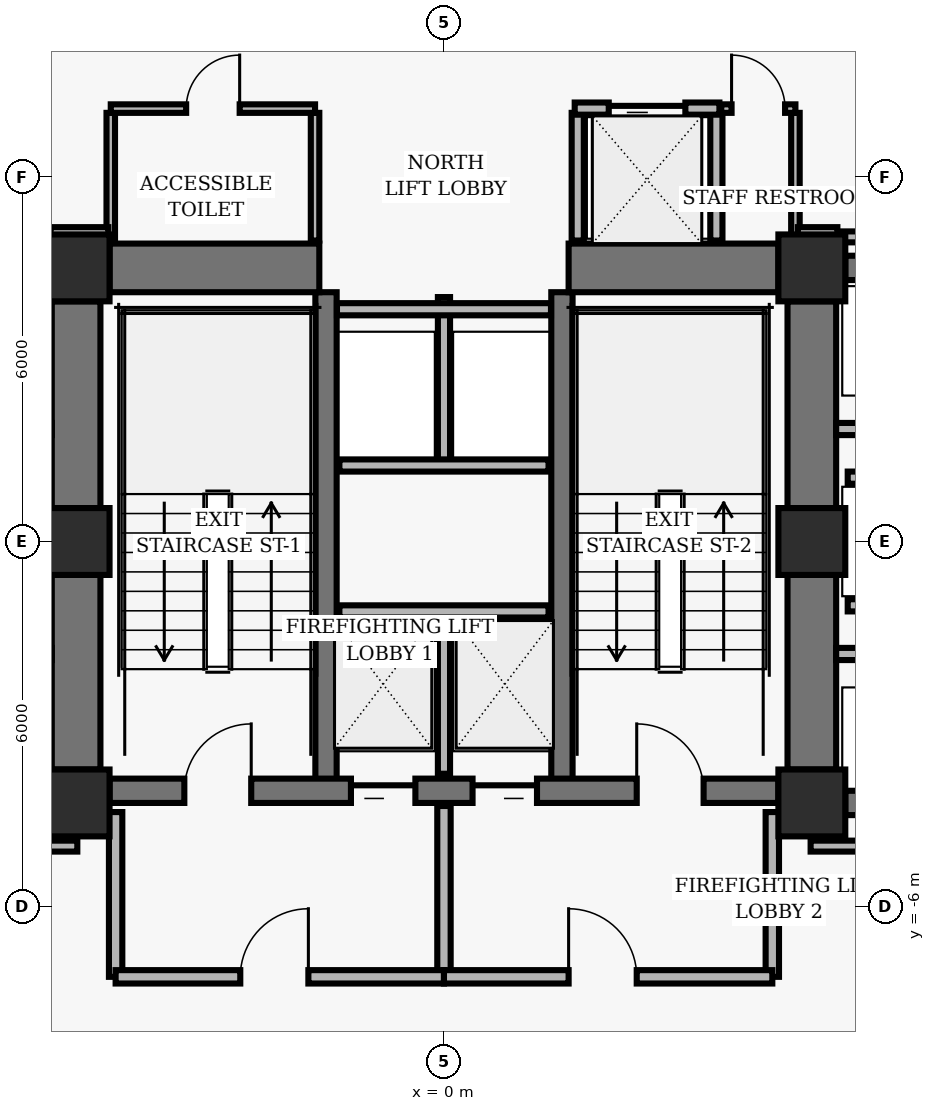
"""IFC4 building model, lengths in metres.
Left out: names, types, materials, properties, quantities, classifications, styles, units other than length and angle.
Written with IfcOpenShell. Run it as: python <this file> out.ifc"""

import sys

from ifc_helpers import new_model, si_unit, direction, frame, frame_2d, origin, origin_2d, place, context, subcontext, project, spatial, rectangle, hollow_rectangle, extrude, element, fill, save


model = new_model("IFC4")
c1 = context("Model", 3, precision=1e-05, world=origin(), true_north=direction((0.0, 1.0)))
c2 = subcontext(c1, "Body", "Model", "MODEL_VIEW")
j1 = project(units=[si_unit("LENGTHUNIT", "METRE"), si_unit("PLANEANGLEUNIT", "RADIAN")], contexts=[c1])
p1 = place(None, origin())
s1 = spatial("IfcSite", under=j1, at=p1, CompositionType="ELEMENT")
p2 = place(p1, origin())
s2 = spatial("IfcBuilding", under=s1, at=p2, CompositionType="ELEMENT")
p3 = place(p2, frame((0.0, 0.0, 4.8)))
s3 = spatial("IfcBuildingStorey", under=s2, at=p3, CompositionType="ELEMENT", Elevation=4.8)
for number, where, z_axis, x_axis in (
    (1, (-6.05, 4.5, 0.0), (0.0, 0.0, 1.0), (1.0, 0.0, 0.0)),
    (2, (6.05, 4.5, 0.0), (0.0, 0.0, 1.0), (1.0, 0.0, 0.0)),
    (3, (-6.05, 0.0, 0.0), (0.0, 0.0, 1.0), (1.0, 0.0, 0.0)),
    (4, (6.05, 0.0, 0.0), (0.0, 0.0, 1.0), (1.0, 0.0, 0.0)),
    (5, (-6.05, -4.3, 0.0), (0.0, 0.0, 1.0), (1.0, 0.0, 0.0)),
    (6, (6.05, -4.3, 0.0), (0.0, 0.0, 1.0), (1.0, 0.0, 0.0)),
):
    element("IfcColumn", number, at=place(p3, frame(where, z_axis=z_axis, x_axis=x_axis)), inside=s3, PredefinedType="COLUMN", context=c2, shape_type="SweptSolid", body=[
        extrude(hollow_rectangle(XDim=1.1, YDim=1.1, WallThickness=0.07, InnerFilletRadius=0.02, OuterFilletRadius=0.04, at=origin_2d()), origin(), (0.0, 0.0, 1.0), 3.52),
    ])
p4 = place(p3, frame((-6.05, 0.55, 0.0), z_axis=(0.0, 0.0, 1.0), x_axis=(0.0, 1.0, 0.0)))
e7 = element("IfcWall", 7, at=p4, inside=s3, PredefinedType="SHEAR", context=c2, shape_type="SweptSolid", body=[
    extrude(rectangle(XDim=3.4, YDim=0.8, at=frame_2d((1.7, 0.0))), origin(), (0.0, 0.0, 1.0), 3.218),
])
p5 = place(p3, frame((-6.05, -3.75, 0.0), z_axis=(0.0, 0.0, 1.0), x_axis=(0.0, 1.0, 0.0)))
e8 = element("IfcWall", 8, at=p5, inside=s3, PredefinedType="SHEAR", context=c2, shape_type="SweptSolid", body=[
    extrude(rectangle(XDim=3.2, YDim=0.8, at=frame_2d((1.6, 0.0))), origin(), (0.0, 0.0, 1.0), 3.218),
])
p6 = place(p3, frame((6.05, 0.55, 0.0), z_axis=(0.0, 0.0, 1.0), x_axis=(0.0, 1.0, 0.0)))
e9 = element("IfcWall", 9, at=p6, inside=s3, PredefinedType="SHEAR", context=c2, shape_type="SweptSolid", body=[
    extrude(rectangle(XDim=3.4, YDim=0.8, at=frame_2d((1.7, 0.0))), origin(), (0.0, 0.0, 1.0), 3.218),
])
p7 = place(p3, frame((6.05, -3.75, 0.0), z_axis=(0.0, 0.0, 1.0), x_axis=(0.0, 1.0, 0.0)))
e10 = element("IfcWall", 10, at=p7, inside=s3, PredefinedType="SHEAR", context=c2, shape_type="SweptSolid", body=[
    extrude(rectangle(XDim=3.2, YDim=0.8, at=frame_2d((1.6, 0.0))), origin(), (0.0, 0.0, 1.0), 3.218),
])
for number, where, z_axis, x_axis in (
    (11, (-1.94, -4.1, 0.0), (0.0, 0.0, 1.0), (0.0, 1.0, 0.0)),
    (12, (1.94, -4.1, 0.0), (0.0, 0.0, 1.0), (0.0, 1.0, 0.0)),
):
    element("IfcWall", number, at=place(p3, frame(where, z_axis=z_axis, x_axis=x_axis)), inside=s3, PredefinedType="SHEAR", context=c2, shape_type="SweptSolid", body=[
        extrude(rectangle(XDim=8.2, YDim=0.35, at=frame_2d((4.1, 0.0))), origin(), (0.0, 0.0, 1.0), 3.218),
    ])
p8 = place(p3, frame((-5.5, -4.1, 0.0), z_axis=(0.0, 0.0, 1.0), x_axis=(1.0, 0.0, 0.0)))
e13 = element("IfcWall", 13, at=p8, inside=s3, PredefinedType="SHEAR", context=c2, shape_type="SweptSolid", body=[
    extrude(rectangle(XDim=11.0, YDim=0.4, at=frame_2d((5.5, 0.0))), origin(), (0.0, 0.0, 1.0), 3.218),
])
p9 = place(p8, frame((1.23, 0.0, 0.0)))
e14 = element("IfcOpeningElement", 14, at=p9, cuts=e13, PredefinedType="OPENING", context=c2, shape_type="SweptSolid", body=[
    extrude(rectangle(XDim=1.1, YDim=2.04, at=frame_2d((0.55, 1.02))), frame((0.0, 0.21, 0.0), z_axis=(0.0, -1.0, 0.0), x_axis=(1.0, 0.0, 0.0)), (0.0, 0.0, 1.0), 0.42),
])
p10 = place(p8, frame((8.67, 0.0, 0.0)))
e15 = element("IfcOpeningElement", 15, at=p10, cuts=e13, PredefinedType="OPENING", context=c2, shape_type="SweptSolid", body=[
    extrude(rectangle(XDim=1.1, YDim=2.04, at=frame_2d((0.55, 1.02))), frame((0.0, 0.21, 0.0), z_axis=(0.0, -1.0, 0.0), x_axis=(1.0, 0.0, 0.0)), (0.0, 0.0, 1.0), 0.42),
])
p11 = place(p8, frame((3.97, 0.0, 0.0)))
e16 = element("IfcOpeningElement", 16, at=p11, cuts=e13, PredefinedType="OPENING", context=c2, shape_type="SweptSolid", body=[
    extrude(rectangle(XDim=1.06, YDim=2.04, at=frame_2d((0.53, 1.02))), frame((0.0, 0.21, 0.0), z_axis=(0.0, -1.0, 0.0), x_axis=(1.0, 0.0, 0.0)), (0.0, 0.0, 1.0), 0.42),
])
p12 = place(p8, frame((5.97, 0.0, 0.0)))
e17 = element("IfcOpeningElement", 17, at=p12, cuts=e13, PredefinedType="OPENING", context=c2, shape_type="SweptSolid", body=[
    extrude(rectangle(XDim=1.06, YDim=2.04, at=frame_2d((0.53, 1.02))), frame((0.0, 0.21, 0.0), z_axis=(0.0, -1.0, 0.0), x_axis=(1.0, 0.0, 0.0)), (0.0, 0.0, 1.0), 0.42),
])
for number, where, z_axis, x_axis in (
    (18, (-5.5, 4.5, 0.0), (0.0, 0.0, 1.0), (1.0, 0.0, 0.0)),
    (19, (2.05, 4.5, 0.0), (0.0, 0.0, 1.0), (1.0, 0.0, 0.0)),
):
    element("IfcWall", number, at=place(p3, frame(where, z_axis=z_axis, x_axis=x_axis)), inside=s3, PredefinedType="SHEAR", context=c2, shape_type="SweptSolid", body=[
        extrude(rectangle(XDim=3.45, YDim=0.8, at=frame_2d((1.725, 0.0))), origin(), (0.0, 0.0, 1.0), 3.218),
    ])
for number, where, z_axis, x_axis in (
    (20, (6.6, 4.5, 0.0), (0.0, 0.0, 1.0), (1.0, 0.0, 0.0)),
    (21, (6.6, -4.3, 0.0), (0.0, 0.0, 1.0), (1.0, 0.0, 0.0)),
):
    element("IfcWall", number, at=place(p3, frame(where, z_axis=z_axis, x_axis=x_axis)), inside=s3, PredefinedType="SHEAR", context=c2, shape_type="SweptSolid", body=[
        extrude(rectangle(XDim=1.8, YDim=0.4, at=frame_2d((0.9, 0.0))), origin(), (0.0, 0.0, 1.0), 3.218),
    ])
p13 = place(p3, frame((0.0, -3.82, 0.0), z_axis=(0.0, 0.0, 1.0), x_axis=(0.0, 1.0, 0.0)))
e22 = element("IfcWall", 22, at=p13, inside=s3, PredefinedType="PARTITIONING", context=c2, shape_type="SweptSolid", body=[
    extrude(rectangle(XDim=2.67, YDim=0.2, at=frame_2d((1.335, 0.0))), origin(), (0.0, 0.0, 1.0), 3.193),
])
p14 = place(p3, frame((-1.72, -1.15, 0.0), z_axis=(0.0, 0.0, 1.0), x_axis=(1.0, 0.0, 0.0)))
e23 = element("IfcWall", 23, at=p14, inside=s3, PredefinedType="PARTITIONING", context=c2, shape_type="SweptSolid", body=[
    extrude(rectangle(XDim=3.44, YDim=0.2, at=frame_2d((1.72, 0.0))), origin(), (0.0, 0.0, 1.0), 3.193),
])
for number, where, z_axis, x_axis in (
    (24, (-5.4, -7.16, 0.0), (0.0, 0.0, 1.0), (0.0, 1.0, 0.0)),
    (25, (5.4, -7.16, 0.0), (0.0, 0.0, 1.0), (0.0, 1.0, 0.0)),
):
    element("IfcWall", number, at=place(p3, frame(where, z_axis=z_axis, x_axis=x_axis)), inside=s3, PredefinedType="PARTITIONING", context=c2, shape_type="SweptSolid", body=[
        extrude(rectangle(XDim=2.71, YDim=0.22, at=frame_2d((1.355, 0.0))), origin(), (0.0, 0.0, 1.0), 3.193),
    ])
p15 = place(p3, frame((0.0, -7.16, 0.0), z_axis=(0.0, 0.0, 1.0), x_axis=(0.0, 1.0, 0.0)))
e26 = element("IfcWall", 26, at=p15, inside=s3, PredefinedType="PARTITIONING", context=c2, shape_type="SweptSolid", body=[
    extrude(rectangle(XDim=2.81, YDim=0.22, at=frame_2d((1.405, 0.0))), origin(), (0.0, 0.0, 1.0), 3.193),
])
p16 = place(p3, frame((-5.4, -7.16, 0.0), z_axis=(0.0, 0.0, 1.0), x_axis=(1.0, 0.0, 0.0)))
e27 = element("IfcWall", 27, at=p16, inside=s3, PredefinedType="PARTITIONING", context=c2, shape_type="SweptSolid", body=[
    extrude(rectangle(XDim=5.4, YDim=0.22, at=frame_2d((2.7, 0.0))), origin(), (0.0, 0.0, 1.0), 3.193),
])
p17 = place(p16, frame((2.05, 0.0, 0.0)))
e28 = element("IfcOpeningElement", 28, at=p17, cuts=e27, PredefinedType="OPENING", context=c2, shape_type="SweptSolid", body=[
    extrude(rectangle(XDim=1.12, YDim=2.02, at=frame_2d((0.56, 1.01))), frame((0.0, 0.12, 0.0), z_axis=(0.0, -1.0, 0.0), x_axis=(1.0, 0.0, 0.0)), (0.0, 0.0, 1.0), 0.24),
])
p18 = place(p3, frame((0.0, -7.16, 0.0), z_axis=(0.0, 0.0, 1.0), x_axis=(1.0, 0.0, 0.0)))
e29 = element("IfcWall", 29, at=p18, inside=s3, PredefinedType="PARTITIONING", context=c2, shape_type="SweptSolid", body=[
    extrude(rectangle(XDim=5.4, YDim=0.22, at=frame_2d((2.7, 0.0))), origin(), (0.0, 0.0, 1.0), 3.193),
])
p19 = place(p18, frame((2.05, 0.0, 0.0)))
e30 = element("IfcOpeningElement", 30, at=p19, cuts=e29, PredefinedType="OPENING", context=c2, shape_type="SweptSolid", body=[
    extrude(rectangle(XDim=1.12, YDim=2.02, at=frame_2d((0.56, 1.01))), frame((0.0, 0.12, 0.0), z_axis=(0.0, -1.0, 0.0), x_axis=(1.0, 0.0, 0.0)), (0.0, 0.0, 1.0), 0.24),
])
p20 = place(p3, frame((0.0, 1.25, 0.0), z_axis=(0.0, 0.0, 1.0), x_axis=(0.0, 1.0, 0.0)))
e31 = element("IfcWall", 31, at=p20, inside=s3, PredefinedType="PARTITIONING", context=c2, shape_type="SweptSolid", body=[
    extrude(rectangle(XDim=2.77, YDim=0.2, at=frame_2d((1.385, 0.0))), origin(), (0.0, 0.0, 1.0), 3.193),
])
p21 = place(p3, frame((-1.72, 1.25, 0.0), z_axis=(0.0, 0.0, 1.0), x_axis=(1.0, 0.0, 0.0)))
e32 = element("IfcWall", 32, at=p21, inside=s3, PredefinedType="PARTITIONING", context=c2, shape_type="SweptSolid", body=[
    extrude(rectangle(XDim=3.44, YDim=0.2, at=frame_2d((1.72, 0.0))), origin(), (0.0, 0.0, 1.0), 3.193),
])
p22 = place(p3, frame((-1.76, 3.82, 0.0), z_axis=(0.0, 0.0, 1.0), x_axis=(1.0, 0.0, 0.0)))
e33 = element("IfcWall", 33, at=p22, inside=s3, PredefinedType="PARTITIONING", context=c2, shape_type="SweptSolid", body=[
    extrude(rectangle(XDim=3.52, YDim=0.2, at=frame_2d((1.76, 0.0))), origin(), (0.0, 0.0, 1.0), 3.193),
])
for number, where, z_axis, x_axis in (
    (34, (2.2, 4.95, 0.0), (0.0, 0.0, 1.0), (0.0, 1.0, 0.0)),
    (35, (4.48, 4.95, 0.0), (0.0, 0.0, 1.0), (0.0, 1.0, 0.0)),
):
    element("IfcWall", number, at=place(p3, frame(where, z_axis=z_axis, x_axis=x_axis)), inside=s3, PredefinedType="PARTITIONING", context=c2, shape_type="SweptSolid", body=[
        extrude(rectangle(XDim=2.1, YDim=0.2, at=frame_2d((1.05, 0.0))), origin(), (0.0, 0.0, 1.0), 3.193),
    ])
p23 = place(p3, frame((2.15, 7.12, 0.0), z_axis=(0.0, 0.0, 1.0), x_axis=(1.0, 0.0, 0.0)))
e36 = element("IfcWall", 36, at=p23, inside=s3, PredefinedType="PARTITIONING", context=c2, shape_type="SweptSolid", body=[
    extrude(rectangle(XDim=2.38, YDim=0.2, at=frame_2d((1.19, 0.0))), origin(), (0.0, 0.0, 1.0), 3.193),
])
p24 = place(p23, frame((0.56, 0.0, 0.0)))
e37 = element("IfcOpeningElement", 37, at=p24, cuts=e36, PredefinedType="OPENING", context=c2, shape_type="SweptSolid", body=[
    extrude(rectangle(XDim=1.26, YDim=2.06, at=frame_2d((0.63, 1.03))), frame((0.0, 0.11, 0.0), z_axis=(0.0, -1.0, 0.0), x_axis=(1.0, 0.0, 0.0)), (0.0, 0.0, 1.0), 0.22),
])
for number, where, z_axis, x_axis in (
    (38, (-5.48, 4.95, 0.0), (0.0, 0.0, 1.0), (0.0, 1.0, 0.0)),
    (39, (-2.12, 4.95, 0.0), (0.0, 0.0, 1.0), (0.0, 1.0, 0.0)),
):
    element("IfcWall", number, at=place(p3, frame(where, z_axis=z_axis, x_axis=x_axis)), inside=s3, PredefinedType="PARTITIONING", context=c2, shape_type="SweptSolid", body=[
        extrude(rectangle(XDim=2.1, YDim=0.14, at=frame_2d((1.05, 0.0))), origin(), (0.0, 0.0, 1.0), 3.193),
    ])
p25 = place(p3, frame((-5.48, 7.12, 0.0), z_axis=(0.0, 0.0, 1.0), x_axis=(1.0, 0.0, 0.0)))
e40 = element("IfcWall", 40, at=p25, inside=s3, PredefinedType="PARTITIONING", context=c2, shape_type="SweptSolid", body=[
    extrude(rectangle(XDim=3.36, YDim=0.14, at=frame_2d((1.68, 0.0))), origin(), (0.0, 0.0, 1.0), 3.193),
])
p26 = place(p25, frame((1.24, 0.0, 0.0)))
e41 = element("IfcOpeningElement", 41, at=p26, cuts=e40, PredefinedType="OPENING", context=c2, shape_type="SweptSolid", body=[
    extrude(rectangle(XDim=0.88, YDim=2.02, at=frame_2d((0.44, 1.01))), frame((0.0, 0.08, 0.0), z_axis=(0.0, -1.0, 0.0), x_axis=(1.0, 0.0, 0.0)), (0.0, 0.0, 1.0), 0.16),
])
p27 = place(p3, frame((5.78, 4.95, 0.0), z_axis=(0.0, 0.0, 1.0), x_axis=(0.0, 1.0, 0.0)))
e42 = element("IfcWall", 42, at=p27, inside=s3, PredefinedType="PARTITIONING", context=c2, shape_type="SweptSolid", body=[
    extrude(rectangle(XDim=2.1, YDim=0.14, at=frame_2d((1.05, 0.0))), origin(), (0.0, 0.0, 1.0), 2.246),
])
p28 = place(p3, frame((4.56, 7.12, 0.0), z_axis=(0.0, 0.0, 1.0), x_axis=(1.0, 0.0, 0.0)))
e43 = element("IfcWall", 43, at=p28, inside=s3, PredefinedType="PARTITIONING", context=c2, shape_type="SweptSolid", body=[
    extrude(rectangle(XDim=1.22, YDim=0.14, at=frame_2d((0.61, 0.0))), origin(), (0.0, 0.0, 1.0), 3.193),
])
p29 = place(p28, frame((0.17, 0.0, 0.0)))
e44 = element("IfcOpeningElement", 44, at=p29, cuts=e43, PredefinedType="OPENING", context=c2, shape_type="SweptSolid", body=[
    extrude(rectangle(XDim=0.88, YDim=2.02, at=frame_2d((0.44, 1.01))), frame((0.0, 0.08, 0.0), z_axis=(0.0, -1.0, 0.0), x_axis=(1.0, 0.0, 0.0)), (0.0, 0.0, 1.0), 0.16),
])
for number, where, z_axis, x_axis in (
    (45, (6.45, -1.85, 0.0), (0.0, 0.0, 1.0), (1.0, 0.0, 0.0)),
    (46, (6.45, 1.85, 0.0), (0.0, 0.0, 1.0), (1.0, 0.0, 0.0)),
):
    element("IfcWall", number, at=place(p3, frame(where, z_axis=z_axis, x_axis=x_axis)), inside=s3, PredefinedType="PARTITIONING", context=c2, shape_type="SweptSolid", body=[
        extrude(rectangle(XDim=2.1, YDim=0.2, at=frame_2d((1.05, 0.0))), origin(), (0.0, 0.0, 1.0), 3.193),
    ])
for number, where, z_axis, x_axis in (
    (47, (6.64, -1.05, 0.0), (0.0, 0.0, 1.0), (1.0, 0.0, 0.0)),
    (48, (6.64, 1.05, 0.0), (0.0, 0.0, 1.0), (1.0, 0.0, 0.0)),
):
    element("IfcWall", number, at=place(p3, frame(where, z_axis=z_axis, x_axis=x_axis)), inside=s3, PredefinedType="PARTITIONING", context=c2, shape_type="SweptSolid", body=[
        extrude(rectangle(XDim=1.91, YDim=0.2, at=frame_2d((0.955, 0.0))), origin(), (0.0, 0.0, 1.0), 3.193),
    ])
for number, where, z_axis, x_axis in (
    (49, (-9.37, -5.01, 0.0), (0.0, 0.0, 1.0), (1.0, 0.0, 0.0)),
    (50, (6.03, -5.01, 0.0), (0.0, 0.0, 1.0), (1.0, 0.0, 0.0)),
):
    element("IfcWall", number, at=place(p3, frame(where, z_axis=z_axis, x_axis=x_axis)), inside=s3, PredefinedType="PARTITIONING", context=c2, shape_type="SweptSolid", body=[
        extrude(rectangle(XDim=3.34, YDim=0.18, at=frame_2d((1.67, 0.0))), origin(), (0.0, 0.0, 1.0), 3.193),
    ])
p30 = place(p3, frame((9.37, 5.01, 0.0), z_axis=(0.0, 0.0, 1.0), x_axis=(-1.0, 0.0, 0.0)))
e51 = element("IfcWall", 51, at=p30, inside=s3, PredefinedType="PARTITIONING", context=c2, shape_type="SweptSolid", body=[
    extrude(rectangle(XDim=2.808, YDim=0.18, at=frame_2d((1.404, 0.0))), origin(), (0.0, 0.0, 1.0), 3.193),
])
p31 = place(p3, frame((6.47, 5.08, 0.0), z_axis=(0.0, 0.0, 1.0), x_axis=(-1.0, 0.0, 0.0)))
e52 = element("IfcWall", 52, at=p31, inside=s3, PredefinedType="PARTITIONING", context=c2, shape_type="SweptSolid", body=[
    extrude(rectangle(XDim=0.65, YDim=0.18, at=frame_2d((0.325, 0.0))), origin(), (0.0, 0.0, 1.0), 3.193),
])
p32 = place(p3, frame((-5.52, 5.08, 0.0), z_axis=(0.0, 0.0, 1.0), x_axis=(-1.0, 0.0, 0.0)))
e53 = element("IfcWall", 53, at=p32, inside=s3, PredefinedType="PARTITIONING", context=c2, shape_type="SweptSolid", body=[
    extrude(rectangle(XDim=0.95, YDim=0.18, at=frame_2d((0.475, 0.0))), origin(), (0.0, 0.0, 1.0), 3.193),
])
p33 = place(p9, origin())
e54 = element("IfcDoor", 54, at=p33, inside=s3, OperationType="SINGLE_SWING_RIGHT", PredefinedType="DOOR", context=c2, shape_type="SweptSolid", body=[
    extrude(rectangle(XDim=1.1, YDim=2.04, at=frame_2d((0.55, 1.02))), frame((0.0, 0.025, 0.0), z_axis=(0.0, -1.0, 0.0), x_axis=(1.0, 0.0, 0.0)), (0.0, 0.0, 1.0), 0.05),
])
fill(e14, e54)
p34 = place(p10, origin())
e55 = element("IfcDoor", 55, at=p34, inside=s3, OperationType="SINGLE_SWING_LEFT", PredefinedType="DOOR", context=c2, shape_type="SweptSolid", body=[
    extrude(rectangle(XDim=1.1, YDim=2.04, at=frame_2d((0.55, 1.02))), frame((0.0, 0.025, 0.0), z_axis=(0.0, -1.0, 0.0), x_axis=(1.0, 0.0, 0.0)), (0.0, 0.0, 1.0), 0.05),
])
fill(e15, e55)
p35 = place(p11, origin())
e56 = element("IfcDoor", 56, at=p35, inside=s3, OperationType="SLIDING_TO_LEFT", PredefinedType="DOOR", context=c2, shape_type="SweptSolid", body=[
    extrude(rectangle(XDim=1.06, YDim=2.04, at=frame_2d((0.53, 1.02))), frame((0.0, 0.025, 0.0), z_axis=(0.0, -1.0, 0.0), x_axis=(1.0, 0.0, 0.0)), (0.0, 0.0, 1.0), 0.05),
])
fill(e16, e56)
p36 = place(p12, origin())
e57 = element("IfcDoor", 57, at=p36, inside=s3, OperationType="SLIDING_TO_RIGHT", PredefinedType="DOOR", context=c2, shape_type="SweptSolid", body=[
    extrude(rectangle(XDim=1.06, YDim=2.04, at=frame_2d((0.53, 1.02))), frame((0.0, 0.025, 0.0), z_axis=(0.0, -1.0, 0.0), x_axis=(1.0, 0.0, 0.0)), (0.0, 0.0, 1.0), 0.05),
])
fill(e17, e57)
p37 = place(p17, origin())
e58 = element("IfcDoor", 58, at=p37, inside=s3, OperationType="SINGLE_SWING_RIGHT", PredefinedType="DOOR", context=c2, shape_type="SweptSolid", body=[
    extrude(rectangle(XDim=1.12, YDim=2.02, at=frame_2d((0.56, 1.01))), frame((0.0, 0.025, 0.0), z_axis=(0.0, -1.0, 0.0), x_axis=(1.0, 0.0, 0.0)), (0.0, 0.0, 1.0), 0.05),
])
fill(e28, e58)
p38 = place(p19, origin())
e59 = element("IfcDoor", 59, at=p38, inside=s3, OperationType="SINGLE_SWING_LEFT", PredefinedType="DOOR", context=c2, shape_type="SweptSolid", body=[
    extrude(rectangle(XDim=1.12, YDim=2.02, at=frame_2d((0.56, 1.01))), frame((0.0, 0.025, 0.0), z_axis=(0.0, -1.0, 0.0), x_axis=(1.0, 0.0, 0.0)), (0.0, 0.0, 1.0), 0.05),
])
fill(e30, e59)
p39 = place(p24, origin())
e60 = element("IfcDoor", 60, at=p39, inside=s3, OperationType="SLIDING_TO_LEFT", PredefinedType="DOOR", context=c2, shape_type="SweptSolid", body=[
    extrude(rectangle(XDim=1.26, YDim=2.06, at=frame_2d((0.63, 1.03))), frame((0.0, 0.025, 0.0), z_axis=(0.0, -1.0, 0.0), x_axis=(1.0, 0.0, 0.0)), (0.0, 0.0, 1.0), 0.05),
])
fill(e37, e60)
p40 = place(p26, origin())
e61 = element("IfcDoor", 61, at=p40, inside=s3, OperationType="SINGLE_SWING_RIGHT", PredefinedType="DOOR", context=c2, shape_type="SweptSolid", body=[
    extrude(rectangle(XDim=0.88, YDim=2.02, at=frame_2d((0.44, 1.01))), frame((0.0, 0.025, 0.0), z_axis=(0.0, -1.0, 0.0), x_axis=(1.0, 0.0, 0.0)), (0.0, 0.0, 1.0), 0.05),
])
fill(e41, e61)
p41 = place(p29, origin())
e62 = element("IfcDoor", 62, at=p41, inside=s3, OperationType="SINGLE_SWING_LEFT", PredefinedType="DOOR", context=c2, shape_type="SweptSolid", body=[
    extrude(rectangle(XDim=0.88, YDim=2.02, at=frame_2d((0.44, 1.01))), frame((0.0, 0.025, 0.0), z_axis=(0.0, -1.0, 0.0), x_axis=(1.0, 0.0, 0.0)), (0.0, 0.0, 1.0), 0.05),
])
fill(e44, e62)
save(model, sys.argv[1])
